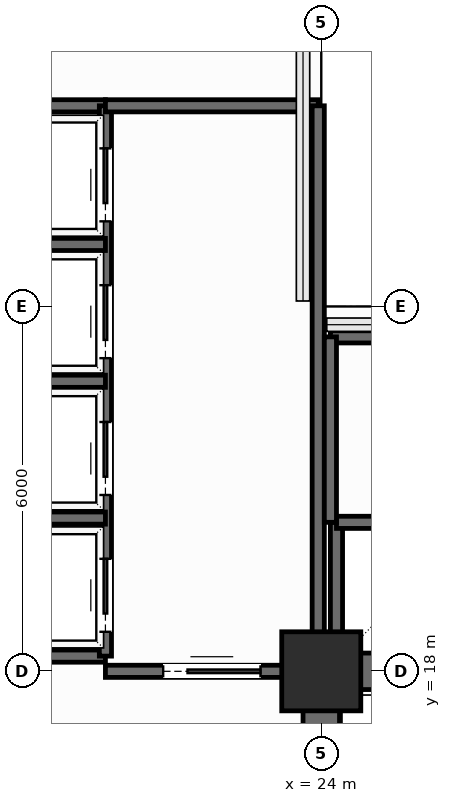
"""IFC4 building model, lengths in metres.
Left out: names, types, materials, properties, quantities, classifications, styles, units other than length and angle.
Written with IfcOpenShell. Run it as: python <this file> out.ifc"""

import sys

from ifc_helpers import new_model, si_unit, direction, frame, frame_2d, origin, origin_2d, place, context, subcontext, project, spatial, rectangle, extrude, element, fill, save


model = new_model("IFC4")
c1 = context("Model", 3, precision=1e-05, world=origin(), true_north=direction((0.0, 1.0)))
c2 = subcontext(c1, "Body", "Model", "MODEL_VIEW")
j1 = project(units=[si_unit("LENGTHUNIT", "METRE"), si_unit("PLANEANGLEUNIT", "RADIAN")], contexts=[c1])
p1 = place(None, origin())
s1 = spatial("IfcSite", under=j1, at=p1, CompositionType="ELEMENT")
p2 = place(p1, origin())
s2 = spatial("IfcBuilding", under=s1, at=p2, CompositionType="ELEMENT")
p3 = place(p2, frame((0.0, 0.0, 48.0)))
s3 = spatial("IfcBuildingStorey", under=s2, at=p3, CompositionType="ELEMENT", Elevation=48.0)
p4 = place(p3, frame((24.0, 18.0, 0.0), z_axis=(0.0, 0.0, 1.0), x_axis=(1.0, 0.0, 0.0)))
e1 = element("IfcColumn", 1, at=p4, inside=s3, PredefinedType="COLUMN", context=c2, shape_type="SweptSolid", body=[
    extrude(rectangle(XDim=1.3, YDim=1.3, at=origin_2d()), origin(), (0.0, 0.0, 1.0), 3.9),
])
p5 = place(p3, frame((24.0, 18.0, 0.0), z_axis=(0.0, 0.0, 1.0), x_axis=(1.0, 0.0, 0.0)))
e2 = element("IfcWall", 2, at=p5, inside=s3, PredefinedType="SHEAR", context=c2, shape_type="SweptSolid", body=[
    extrude(rectangle(XDim=9.6, YDim=0.6, at=frame_2d((4.8, 0.0))), origin(), (0.0, 0.0, 1.0), 3.65),
])
p6 = place(p3, frame((24.0, 6.0, 0.0), z_axis=(0.0, 0.0, 1.0), x_axis=(0.0, 1.0, 0.0)))
e3 = element("IfcWall", 3, at=p6, inside=s3, PredefinedType="SHEAR", context=c2, shape_type="SweptSolid", body=[
    extrude(rectangle(XDim=12.0, YDim=0.6, at=frame_2d((6.0, 0.0))), origin(), (0.0, 0.0, 1.0), 3.65),
])
p7 = place(p6, frame((7.15, 0.0, 0.0)))
e4 = element("IfcOpeningElement", 4, at=p7, cuts=e3, PredefinedType="OPENING", context=c2, shape_type="SweptSolid", body=[
    extrude(rectangle(XDim=1.6, YDim=2.3, at=frame_2d((0.8, 1.15))), frame((0.0, 0.31, 0.0), z_axis=(0.0, -1.0, 0.0), x_axis=(1.0, 0.0, 0.0)), (0.0, 0.0, 1.0), 0.62),
])
for number, where, z_axis, x_axis in (
    (5, (18.1, 27.3, 0.0), (0.0, 0.0, 1.0), (1.0, 0.0, 0.0)),
    (6, (18.1, 18.25, 0.0), (0.0, 0.0, 1.0), (1.0, 0.0, 0.0)),
):
    element("IfcWall", number, at=place(p3, frame(where, z_axis=z_axis, x_axis=x_axis)), inside=s3, PredefinedType="SHEAR", context=c2, shape_type="SweptSolid", body=[
        extrude(rectangle(XDim=2.35, YDim=0.2, at=frame_2d((1.175, 0.0))), origin(), (0.0, 0.0, 1.0), 3.65),
    ])
p8 = place(p3, frame((20.45, 18.25, 0.0), z_axis=(0.0, 0.0, 1.0), x_axis=(0.0, 1.0, 0.0)))
e7 = element("IfcWall", 7, at=p8, inside=s3, PredefinedType="SHEAR", context=c2, shape_type="SweptSolid", body=[
    extrude(rectangle(XDim=9.05, YDim=0.2, at=frame_2d((4.525, 0.0))), origin(), (0.0, 0.0, 1.0), 3.65),
])
p9 = place(p8, frame((0.4, 0.0, 0.0)))
e8 = element("IfcOpeningElement", 8, at=p9, cuts=e7, PredefinedType="OPENING", context=c2, shape_type="SweptSolid", body=[
    extrude(rectangle(XDim=1.2, YDim=2.2, at=frame_2d((0.6, 1.1))), frame((0.0, 0.11, 0.0), z_axis=(0.0, -1.0, 0.0), x_axis=(1.0, 0.0, 0.0)), (0.0, 0.0, 1.0), 0.22),
])
p10 = place(p8, frame((2.65, 0.0, 0.0)))
e9 = element("IfcOpeningElement", 9, at=p10, cuts=e7, PredefinedType="OPENING", context=c2, shape_type="SweptSolid", body=[
    extrude(rectangle(XDim=1.2, YDim=2.2, at=frame_2d((0.6, 1.1))), frame((0.0, 0.11, 0.0), z_axis=(0.0, -1.0, 0.0), x_axis=(1.0, 0.0, 0.0)), (0.0, 0.0, 1.0), 0.22),
])
p11 = place(p8, frame((4.9, 0.0, 0.0)))
e10 = element("IfcOpeningElement", 10, at=p11, cuts=e7, PredefinedType="OPENING", context=c2, shape_type="SweptSolid", body=[
    extrude(rectangle(XDim=1.2, YDim=2.2, at=frame_2d((0.6, 1.1))), frame((0.0, 0.11, 0.0), z_axis=(0.0, -1.0, 0.0), x_axis=(1.0, 0.0, 0.0)), (0.0, 0.0, 1.0), 0.22),
])
p12 = place(p8, frame((7.15, 0.0, 0.0)))
e11 = element("IfcOpeningElement", 11, at=p12, cuts=e7, PredefinedType="OPENING", context=c2, shape_type="SweptSolid", body=[
    extrude(rectangle(XDim=1.2, YDim=2.2, at=frame_2d((0.6, 1.1))), frame((0.0, 0.11, 0.0), z_axis=(0.0, -1.0, 0.0), x_axis=(1.0, 0.0, 0.0)), (0.0, 0.0, 1.0), 0.22),
])
for number, where, z_axis, x_axis in (
    (12, (18.15, 20.52, 0.0), (0.0, 0.0, 1.0), (1.0, 0.0, 0.0)),
    (13, (18.15, 22.77, 0.0), (0.0, 0.0, 1.0), (1.0, 0.0, 0.0)),
    (14, (18.15, 25.02, 0.0), (0.0, 0.0, 1.0), (1.0, 0.0, 0.0)),
):
    element("IfcWall", number, at=place(p3, frame(where, z_axis=z_axis, x_axis=x_axis)), inside=s3, PredefinedType="SHEAR", context=c2, shape_type="SweptSolid", body=[
        extrude(rectangle(XDim=2.3, YDim=0.2, at=frame_2d((1.15, 0.0))), origin(), (0.0, 0.0, 1.0), 3.65),
    ])
p13 = place(p3, frame((20.45, 18.0, 0.0), z_axis=(0.0, 0.0, 1.0), x_axis=(1.0, 0.0, 0.0)))
e15 = element("IfcWall", 15, at=p13, inside=s3, PredefinedType="SHEAR", context=c2, shape_type="SweptSolid", body=[
    extrude(rectangle(XDim=3.5, YDim=0.2, at=frame_2d((1.75, 0.0))), origin(), (0.0, 0.0, 1.0), 3.65),
])
p14 = place(p13, frame((0.95, 0.0, 0.0)))
e16 = element("IfcOpeningElement", 16, at=p14, cuts=e15, PredefinedType="OPENING", context=c2, shape_type="SweptSolid", body=[
    extrude(rectangle(XDim=1.6, YDim=2.3, at=frame_2d((0.8, 1.15))), frame((0.0, 0.11, 0.0), z_axis=(0.0, -1.0, 0.0), x_axis=(1.0, 0.0, 0.0)), (0.0, 0.0, 1.0), 0.22),
])
p15 = place(p3, frame((20.45, 27.3, 0.0), z_axis=(0.0, 0.0, 1.0), x_axis=(1.0, 0.0, 0.0)))
e17 = element("IfcWall", 17, at=p15, inside=s3, PredefinedType="SHEAR", context=c2, shape_type="SweptSolid", body=[
    extrude(rectangle(XDim=3.5, YDim=0.2, at=frame_2d((1.75, 0.0))), origin(), (0.0, 0.0, 1.0), 3.65),
])
p16 = place(p3, frame((23.95, 18.0, 0.0), z_axis=(0.0, 0.0, 1.0), x_axis=(0.0, 1.0, 0.0)))
e18 = element("IfcWall", 18, at=p16, inside=s3, PredefinedType="SHEAR", context=c2, shape_type="SweptSolid", body=[
    extrude(rectangle(XDim=9.3, YDim=0.2, at=frame_2d((4.65, 0.0))), origin(), (0.0, 0.0, 1.0), 3.65),
])
p17 = place(p3, frame((24.25, 18.1, 0.0), z_axis=(0.0, 0.0, 1.0), x_axis=(0.0, 1.0, 0.0)))
e19 = element("IfcWall", 19, at=p17, inside=s3, PredefinedType="SHEAR", context=c2, shape_type="SweptSolid", body=[
    extrude(rectangle(XDim=2.35, YDim=0.2, at=frame_2d((1.175, 0.0))), origin(), (0.0, 0.0, 1.0), 3.65),
])
p18 = place(p3, frame((24.25, 20.45, 0.0), z_axis=(0.0, 0.0, 1.0), x_axis=(1.0, 0.0, 0.0)))
e20 = element("IfcWall", 20, at=p18, inside=s3, PredefinedType="SHEAR", context=c2, shape_type="SweptSolid", body=[
    extrude(rectangle(XDim=9.05, YDim=0.2, at=frame_2d((4.525, 0.0))), origin(), (0.0, 0.0, 1.0), 3.65),
])
p19 = place(p3, frame((24.15, 23.5, 0.0), z_axis=(0.0, 0.0, 1.0), x_axis=(1.0, 0.0, 0.0)))
e21 = element("IfcWall", 21, at=p19, inside=s3, PredefinedType="SHEAR", context=c2, shape_type="SweptSolid", body=[
    extrude(rectangle(XDim=9.15, YDim=0.2, at=frame_2d((4.575, 0.0))), origin(), (0.0, 0.0, 1.0), 3.65),
])
p20 = place(p3, frame((24.15, 20.45, 0.0), z_axis=(0.0, 0.0, 1.0), x_axis=(0.0, 1.0, 0.0)))
e22 = element("IfcWall", 22, at=p20, inside=s3, PredefinedType="SHEAR", context=c2, shape_type="SweptSolid", body=[
    extrude(rectangle(XDim=3.05, YDim=0.2, at=frame_2d((1.525, 0.0))), origin(), (0.0, 0.0, 1.0), 3.65),
])
p21 = place(p9, origin())
e23 = element("IfcDoor", 23, at=p21, inside=s3, OperationType="SLIDING_TO_RIGHT", PredefinedType="DOOR", context=c2, shape_type="SweptSolid", body=[
    extrude(rectangle(XDim=1.2, YDim=2.2, at=frame_2d((0.6, 1.1))), frame((0.0, 0.025, 0.0), z_axis=(0.0, -1.0, 0.0), x_axis=(1.0, 0.0, 0.0)), (0.0, 0.0, 1.0), 0.05),
])
fill(e8, e23)
p22 = place(p10, origin())
e24 = element("IfcDoor", 24, at=p22, inside=s3, OperationType="SLIDING_TO_RIGHT", PredefinedType="DOOR", context=c2, shape_type="SweptSolid", body=[
    extrude(rectangle(XDim=1.2, YDim=2.2, at=frame_2d((0.6, 1.1))), frame((0.0, 0.025, 0.0), z_axis=(0.0, -1.0, 0.0), x_axis=(1.0, 0.0, 0.0)), (0.0, 0.0, 1.0), 0.05),
])
fill(e9, e24)
p23 = place(p11, origin())
e25 = element("IfcDoor", 25, at=p23, inside=s3, OperationType="SLIDING_TO_RIGHT", PredefinedType="DOOR", context=c2, shape_type="SweptSolid", body=[
    extrude(rectangle(XDim=1.2, YDim=2.2, at=frame_2d((0.6, 1.1))), frame((0.0, 0.025, 0.0), z_axis=(0.0, -1.0, 0.0), x_axis=(1.0, 0.0, 0.0)), (0.0, 0.0, 1.0), 0.05),
])
fill(e10, e25)
p24 = place(p12, origin())
e26 = element("IfcDoor", 26, at=p24, inside=s3, OperationType="SLIDING_TO_RIGHT", PredefinedType="DOOR", context=c2, shape_type="SweptSolid", body=[
    extrude(rectangle(XDim=1.2, YDim=2.2, at=frame_2d((0.6, 1.1))), frame((0.0, 0.025, 0.0), z_axis=(0.0, -1.0, 0.0), x_axis=(1.0, 0.0, 0.0)), (0.0, 0.0, 1.0), 0.05),
])
fill(e11, e26)
p25 = place(p14, origin())
e27 = element("IfcDoor", 27, at=p25, inside=s3, OperationType="DOUBLE_DOOR_SLIDING", PredefinedType="DOOR", context=c2, shape_type="SweptSolid", body=[
    extrude(rectangle(XDim=1.6, YDim=2.3, at=frame_2d((0.8, 1.15))), frame((0.0, 0.025, 0.0), z_axis=(0.0, -1.0, 0.0), x_axis=(1.0, 0.0, 0.0)), (0.0, 0.0, 1.0), 0.05),
])
fill(e16, e27)
save(model, sys.argv[1])
